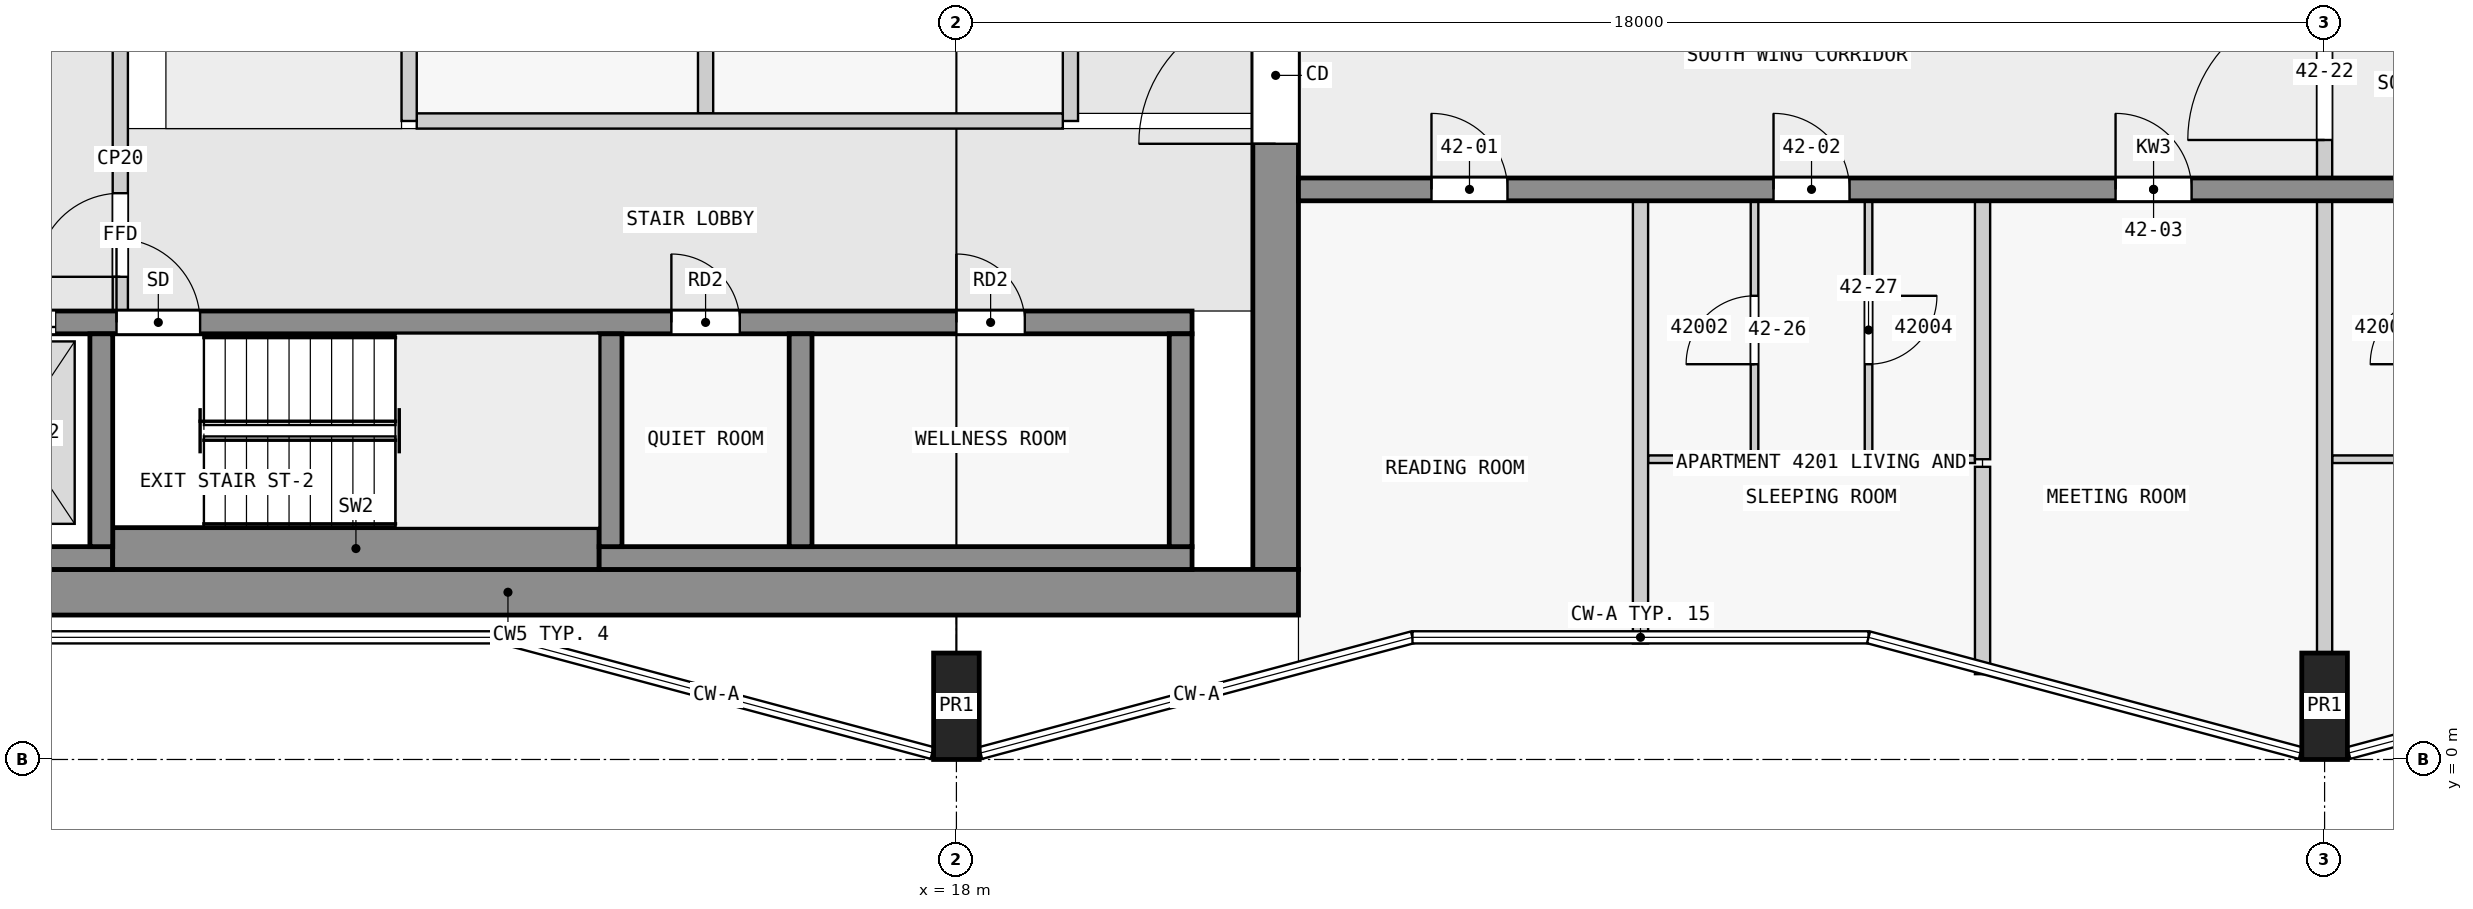
"""IFC4 building model, lengths in metres.
Left out: names, types, materials, properties, quantities, classifications, styles, units other than length and angle.
Written with IfcOpenShell. Run it as: python <this file> out.ifc"""

import sys

from ifc_helpers import new_model, si_unit, direction, frame, frame_2d, origin, origin_2d, place, context, subcontext, project, spatial, rectangle, extrude, element, fill, save


model = new_model("IFC4")
c1 = context("Model", 3, precision=1e-05, world=origin(), true_north=direction((0.0, 1.0)))
c2 = subcontext(c1, "Body", "Model", "MODEL_VIEW")
j1 = project(units=[si_unit("LENGTHUNIT", "METRE"), si_unit("PLANEANGLEUNIT", "RADIAN")], contexts=[c1])
p1 = place(None, origin())
s1 = spatial("IfcSite", under=j1, at=p1, CompositionType="ELEMENT")
p2 = place(p1, origin())
s2 = spatial("IfcBuilding", under=s1, at=p2, CompositionType="ELEMENT")
p3 = place(p2, frame((0.0, 0.0, 163.9)))
s3 = spatial("IfcBuildingStorey", under=s2, at=p3, CompositionType="ELEMENT", Elevation=163.9)
for number, where, z_axis, x_axis in (
    (1, (18.0, 0.7, 0.0), (0.0, 0.0, 1.0), (1.0, 0.0, 0.0)),
    (2, (36.0, 0.7, 0.0), (0.0, 0.0, 1.0), (1.0, 0.0, 0.0)),
):
    element("IfcColumn", number, at=place(p3, frame(where, z_axis=z_axis, x_axis=x_axis)), inside=s3, PredefinedType="COLUMN", context=c2, shape_type="SweptSolid", body=[
        extrude(rectangle(XDim=0.6, YDim=1.4, at=origin_2d()), origin(), (0.0, 0.0, 1.0), 3.5),
    ])
p4 = place(p3, frame((1.7, 2.2, 0.0), z_axis=(0.0, 0.0, 1.0), x_axis=(1.0, 0.0, 0.0)))
e3 = element("IfcWall", 3, at=p4, inside=s3, PredefinedType="SHEAR", context=c2, shape_type="SweptSolid", body=[
    extrude(rectangle(XDim=20.8, YDim=0.6, at=frame_2d((10.4, 0.0))), origin(), (0.0, 0.0, 1.0), 3.25),
])
p5 = place(p3, frame((22.2, 2.5, 0.0), z_axis=(0.0, 0.0, 1.0), x_axis=(0.0, 1.0, 0.0)))
e4 = element("IfcWall", 4, at=p5, inside=s3, PredefinedType="SHEAR", context=c2, shape_type="SweptSolid", body=[
    extrude(rectangle(XDim=14.9, YDim=0.6, at=frame_2d((7.45, 0.0))), origin(), (0.0, 0.0, 1.0), 3.25),
])
p6 = place(p5, frame((5.6, 0.0, 0.0)))
e5 = element("IfcOpeningElement", 5, at=p6, cuts=e4, PredefinedType="OPENING", context=c2, shape_type="SweptSolid", body=[
    extrude(rectangle(XDim=1.8, YDim=2.1, at=frame_2d((0.9, 1.05))), frame((0.0, 0.31, 0.0), z_axis=(0.0, -1.0, 0.0), x_axis=(1.0, 0.0, 0.0)), (0.0, 0.0, 1.0), 0.62),
])
p7 = place(p3, frame((2.3, 2.65, 0.0), z_axis=(0.0, 0.0, 1.0), x_axis=(1.0, 0.0, 0.0)))
e6 = element("IfcWall", 6, at=p7, inside=s3, PredefinedType="SHEAR", context=c2, shape_type="SweptSolid", body=[
    extrude(rectangle(XDim=4.6, YDim=0.3, at=frame_2d((2.3, 0.0))), origin(), (0.0, 0.0, 1.0), 3.25),
])
p8 = place(p3, frame((6.9, 2.775, 0.0), z_axis=(0.0, 0.0, 1.0), x_axis=(1.0, 0.0, 0.0)))
e7 = element("IfcWall", 7, at=p8, inside=s3, PredefinedType="SHEAR", context=c2, shape_type="SweptSolid", body=[
    extrude(rectangle(XDim=6.4, YDim=0.55, at=frame_2d((3.2, 0.0))), origin(), (0.0, 0.0, 1.0), 3.25),
])
p9 = place(p3, frame((13.3, 2.65, 0.0), z_axis=(0.0, 0.0, 1.0), x_axis=(1.0, 0.0, 0.0)))
e8 = element("IfcWall", 8, at=p9, inside=s3, PredefinedType="SHEAR", context=c2, shape_type="SweptSolid", body=[
    extrude(rectangle(XDim=7.8, YDim=0.3, at=frame_2d((3.9, 0.0))), origin(), (0.0, 0.0, 1.0), 3.25),
])
for number, where, z_axis, x_axis in (
    (9, (6.75, 2.8, 0.0), (0.0, 0.0, 1.0), (0.0, 1.0, 0.0)),
    (10, (13.45, 2.8, 0.0), (0.0, 0.0, 1.0), (0.0, 1.0, 0.0)),
    (11, (15.95, 2.8, 0.0), (0.0, 0.0, 1.0), (0.0, 1.0, 0.0)),
    (12, (20.95, 2.8, 0.0), (0.0, 0.0, 1.0), (0.0, 1.0, 0.0)),
):
    element("IfcWall", number, at=place(p3, frame(where, z_axis=z_axis, x_axis=x_axis)), inside=s3, PredefinedType="SHEAR", context=c2, shape_type="SweptSolid", body=[
        extrude(rectangle(XDim=2.8, YDim=0.3, at=frame_2d((1.4, 0.0))), origin(), (0.0, 0.0, 1.0), 3.25),
    ])
p10 = place(p3, frame((2.3, 5.75, 0.0), z_axis=(0.0, 0.0, 1.0), x_axis=(1.0, 0.0, 0.0)))
e13 = element("IfcWall", 13, at=p10, inside=s3, PredefinedType="SHEAR", context=c2, shape_type="SweptSolid", body=[
    extrude(rectangle(XDim=18.8, YDim=0.3, at=frame_2d((9.4, 0.0))), origin(), (0.0, 0.0, 1.0), 3.25),
])
p11 = place(p10, frame((4.65, 0.0, 0.0)))
e14 = element("IfcOpeningElement", 14, at=p11, cuts=e13, PredefinedType="OPENING", context=c2, shape_type="SweptSolid", body=[
    extrude(rectangle(XDim=1.1, YDim=2.1, at=frame_2d((0.55, 1.05))), frame((0.0, 0.16, 0.0), z_axis=(0.0, -1.0, 0.0), x_axis=(1.0, 0.0, 0.0)), (0.0, 0.0, 1.0), 0.32),
])
p12 = place(p10, frame((0.45, 0.0, 0.0)))
e15 = element("IfcOpeningElement", 15, at=p12, cuts=e13, PredefinedType="OPENING", context=c2, shape_type="SweptSolid", body=[
    extrude(rectangle(XDim=1.1, YDim=2.1, at=frame_2d((0.55, 1.05))), frame((0.0, 0.16, 0.0), z_axis=(0.0, -1.0, 0.0), x_axis=(1.0, 0.0, 0.0)), (0.0, 0.0, 1.0), 0.32),
])
p13 = place(p10, frame((2.75, 0.0, 0.0)))
e16 = element("IfcOpeningElement", 16, at=p13, cuts=e13, PredefinedType="OPENING", context=c2, shape_type="SweptSolid", body=[
    extrude(rectangle(XDim=1.1, YDim=2.1, at=frame_2d((0.55, 1.05))), frame((0.0, 0.16, 0.0), z_axis=(0.0, -1.0, 0.0), x_axis=(1.0, 0.0, 0.0)), (0.0, 0.0, 1.0), 0.32),
])
p14 = place(p10, frame((11.95, 0.0, 0.0)))
e17 = element("IfcOpeningElement", 17, at=p14, cuts=e13, PredefinedType="OPENING", context=c2, shape_type="SweptSolid", body=[
    extrude(rectangle(XDim=0.9, YDim=2.1, at=frame_2d((0.45, 1.05))), frame((0.0, 0.16, 0.0), z_axis=(0.0, -1.0, 0.0), x_axis=(1.0, 0.0, 0.0)), (0.0, 0.0, 1.0), 0.32),
])
p15 = place(p10, frame((15.7, 0.0, 0.0)))
e18 = element("IfcOpeningElement", 18, at=p15, cuts=e13, PredefinedType="OPENING", context=c2, shape_type="SweptSolid", body=[
    extrude(rectangle(XDim=0.9, YDim=2.1, at=frame_2d((0.45, 1.05))), frame((0.0, 0.16, 0.0), z_axis=(0.0, -1.0, 0.0), x_axis=(1.0, 0.0, 0.0)), (0.0, 0.0, 1.0), 0.32),
])
p16 = place(p3, frame((22.5, 7.5, 0.0), z_axis=(0.0, 0.0, 1.0), x_axis=(1.0, 0.0, 0.0)))
e19 = element("IfcWall", 19, at=p16, inside=s3, PredefinedType="SHEAR", context=c2, shape_type="SweptSolid", body=[
    extrude(rectangle(XDim=22.5, YDim=0.3, at=frame_2d((11.25, 0.0))), origin(), (0.0, 0.0, 1.0), 3.25),
])
p17 = place(p16, frame((1.75, 0.0, 0.0)))
e20 = element("IfcOpeningElement", 20, at=p17, cuts=e19, PredefinedType="OPENING", context=c2, shape_type="SweptSolid", body=[
    extrude(rectangle(XDim=1.0, YDim=2.1, at=frame_2d((0.5, 1.05))), frame((0.0, 0.16, 0.0), z_axis=(0.0, -1.0, 0.0), x_axis=(1.0, 0.0, 0.0)), (0.0, 0.0, 1.0), 0.32),
])
p18 = place(p16, frame((6.25, 0.0, 0.0)))
e21 = element("IfcOpeningElement", 21, at=p18, cuts=e19, PredefinedType="OPENING", context=c2, shape_type="SweptSolid", body=[
    extrude(rectangle(XDim=1.0, YDim=2.1, at=frame_2d((0.5, 1.05))), frame((0.0, 0.16, 0.0), z_axis=(0.0, -1.0, 0.0), x_axis=(1.0, 0.0, 0.0)), (0.0, 0.0, 1.0), 0.32),
])
p19 = place(p16, frame((10.75, 0.0, 0.0)))
e22 = element("IfcOpeningElement", 22, at=p19, cuts=e19, PredefinedType="OPENING", context=c2, shape_type="SweptSolid", body=[
    extrude(rectangle(XDim=1.0, YDim=2.1, at=frame_2d((0.5, 1.05))), frame((0.0, 0.16, 0.0), z_axis=(0.0, -1.0, 0.0), x_axis=(1.0, 0.0, 0.0)), (0.0, 0.0, 1.0), 0.32),
])
p20 = place(p16, frame((15.25, 0.0, 0.0)))
e23 = element("IfcOpeningElement", 23, at=p20, cuts=e19, PredefinedType="OPENING", context=c2, shape_type="SweptSolid", body=[
    extrude(rectangle(XDim=1.0, YDim=2.1, at=frame_2d((0.5, 1.05))), frame((0.0, 0.16, 0.0), z_axis=(0.0, -1.0, 0.0), x_axis=(1.0, 0.0, 0.0)), (0.0, 0.0, 1.0), 0.32),
])
p21 = place(p16, frame((18.75, 0.0, 0.0)))
e24 = element("IfcOpeningElement", 24, at=p21, cuts=e19, PredefinedType="OPENING", context=c2, shape_type="SweptSolid", body=[
    extrude(rectangle(XDim=0.9, YDim=2.1, at=frame_2d((0.45, 1.05))), frame((0.0, 0.16, 0.0), z_axis=(0.0, -1.0, 0.0), x_axis=(1.0, 0.0, 0.0)), (0.0, 0.0, 1.0), 0.32),
])
p22 = place(p16, frame((20.95, 0.0, 0.0)))
e25 = element("IfcOpeningElement", 25, at=p22, cuts=e19, PredefinedType="OPENING", context=c2, shape_type="SweptSolid", body=[
    extrude(rectangle(XDim=1.0, YDim=2.1, at=frame_2d((0.5, 1.05))), frame((0.0, 0.16, 0.0), z_axis=(0.0, -1.0, 0.0), x_axis=(1.0, 0.0, 0.0)), (0.0, 0.0, 1.0), 0.32),
])
p23 = place(p3, frame((7.0, 5.9, 0.0), z_axis=(0.0, 0.0, 1.0), x_axis=(0.0, 1.0, 0.0)))
e26 = element("IfcWall", 26, at=p23, inside=s3, PredefinedType="PARTITIONING", context=c2, shape_type="SweptSolid", body=[
    extrude(rectangle(XDim=4.0, YDim=0.2, at=frame_2d((2.0, 0.0))), origin(), (0.0, 0.0, 1.0), 3.25),
])
p24 = place(p23, frame((0.45, 0.0, 0.0)))
e27 = element("IfcOpeningElement", 27, at=p24, cuts=e26, PredefinedType="OPENING", context=c2, shape_type="SweptSolid", body=[
    extrude(rectangle(XDim=1.1, YDim=2.1, at=frame_2d((0.55, 1.05))), frame((0.0, 0.11, 0.0), z_axis=(0.0, -1.0, 0.0), x_axis=(1.0, 0.0, 0.0)), (0.0, 0.0, 1.0), 0.22),
])
p25 = place(p3, frame((10.8, 8.4, 0.0), z_axis=(0.0, 0.0, 1.0), x_axis=(0.0, 1.0, 0.0)))
e28 = element("IfcWall", 28, at=p25, inside=s3, PredefinedType="PARTITIONING", context=c2, shape_type="SweptSolid", body=[
    extrude(rectangle(XDim=3.8, YDim=0.2, at=frame_2d((1.9, 0.0))), origin(), (0.0, 0.0, 1.0), 3.25),
])
p26 = place(p3, frame((10.9, 8.4, 0.0), z_axis=(0.0, 0.0, 1.0), x_axis=(1.0, 0.0, 0.0)))
e29 = element("IfcWall", 29, at=p26, inside=s3, PredefinedType="PARTITIONING", context=c2, shape_type="SweptSolid", body=[
    extrude(rectangle(XDim=8.5, YDim=0.2, at=frame_2d((4.25, 0.0))), origin(), (0.0, 0.0, 1.0), 3.25),
])
p27 = place(p3, frame((19.5, 8.4, 0.0), z_axis=(0.0, 0.0, 1.0), x_axis=(0.0, 1.0, 0.0)))
e30 = element("IfcWall", 30, at=p27, inside=s3, PredefinedType="PARTITIONING", context=c2, shape_type="SweptSolid", body=[
    extrude(rectangle(XDim=3.8, YDim=0.2, at=frame_2d((1.9, 0.0))), origin(), (0.0, 0.0, 1.0), 3.25),
])
p28 = place(p3, frame((14.7, 8.5, 0.0), z_axis=(0.0, 0.0, 1.0), x_axis=(0.0, 1.0, 0.0)))
e31 = element("IfcWall", 31, at=p28, inside=s3, PredefinedType="PARTITIONING", context=c2, shape_type="SweptSolid", body=[
    extrude(rectangle(XDim=3.6, YDim=0.2, at=frame_2d((1.8, 0.0))), origin(), (0.0, 0.0, 1.0), 3.25),
])
for number, where, z_axis, x_axis in (
    (32, (27.1, 3.95, 0.0), (0.0, 0.0, 1.0), (1.0, 0.0, 0.0)),
    (33, (30.05, 3.95, 0.0), (0.0, 0.0, 1.0), (1.0, 0.0, 0.0)),
    (34, (36.1, 3.95, 0.0), (0.0, 0.0, 1.0), (1.0, 0.0, 0.0)),
):
    element("IfcWall", number, at=place(p3, frame(where, z_axis=z_axis, x_axis=x_axis)), inside=s3, PredefinedType="PARTITIONING", context=c2, shape_type="SweptSolid", body=[
        extrude(rectangle(XDim=1.35, YDim=0.1, at=frame_2d((0.675, 0.0))), origin(), (0.0, 0.0, 1.0), 3.25),
    ])
p29 = place(p3, frame((27.0, 1.527, 0.0), z_axis=(0.0, 0.0, 1.0), x_axis=(0.0, 1.0, 0.0)))
e35 = element("IfcWall", 35, at=p29, inside=s3, PredefinedType="PARTITIONING", context=c2, shape_type="SweptSolid", body=[
    extrude(rectangle(XDim=5.823, YDim=0.2, at=frame_2d((2.912, 0.0))), origin(), (0.0, 0.0, 1.0), 3.25),
])
p30 = place(p3, frame((28.5, 3.95, 0.0), z_axis=(0.0, 0.0, 1.0), x_axis=(0.0, 1.0, 0.0)))
e36 = element("IfcWall", 36, at=p30, inside=s3, PredefinedType="PARTITIONING", context=c2, shape_type="SweptSolid", body=[
    extrude(rectangle(XDim=3.4, YDim=0.1, at=frame_2d((1.7, 0.0))), origin(), (0.0, 0.0, 1.0), 3.25),
])
p31 = place(p30, frame((1.25, 0.0, 0.0)))
e37 = element("IfcOpeningElement", 37, at=p31, cuts=e36, PredefinedType="OPENING", context=c2, shape_type="SweptSolid", body=[
    extrude(rectangle(XDim=0.9, YDim=2.1, at=frame_2d((0.45, 1.05))), frame((0.0, 0.06, 0.0), z_axis=(0.0, -1.0, 0.0), x_axis=(1.0, 0.0, 0.0)), (0.0, 0.0, 1.0), 0.12),
])
p32 = place(p3, frame((30.0, 7.35, 0.0), z_axis=(0.0, 0.0, 1.0), x_axis=(0.0, -1.0, 0.0)))
e38 = element("IfcWall", 38, at=p32, inside=s3, PredefinedType="PARTITIONING", context=c2, shape_type="SweptSolid", body=[
    extrude(rectangle(XDim=3.4, YDim=0.1, at=frame_2d((1.7, 0.0))), origin(), (0.0, 0.0, 1.0), 3.25),
])
p33 = place(p32, frame((1.25, 0.0, 0.0)))
e39 = element("IfcOpeningElement", 39, at=p33, cuts=e38, PredefinedType="OPENING", context=c2, shape_type="SweptSolid", body=[
    extrude(rectangle(XDim=0.9, YDim=2.1, at=frame_2d((0.45, 1.05))), frame((0.0, 0.06, 0.0), z_axis=(0.0, -1.0, 0.0), x_axis=(1.0, 0.0, 0.0)), (0.0, 0.0, 1.0), 0.12),
])
p34 = place(p3, frame((31.5, 3.85, 0.0), z_axis=(0.0, 0.0, 1.0), x_axis=(0.0, -1.0, 0.0)))
e40 = element("IfcWall", 40, at=p34, inside=s3, PredefinedType="PARTITIONING", context=c2, shape_type="SweptSolid", body=[
    extrude(rectangle(XDim=2.728, YDim=0.2, at=frame_2d((1.364, 0.0))), origin(), (0.0, 0.0, 1.0), 3.25),
])
p35 = place(p3, frame((31.5, 3.95, 0.0), z_axis=(0.0, 0.0, 1.0), x_axis=(0.0, 1.0, 0.0)))
e41 = element("IfcWall", 41, at=p35, inside=s3, PredefinedType="PARTITIONING", context=c2, shape_type="SweptSolid", body=[
    extrude(rectangle(XDim=3.4, YDim=0.2, at=frame_2d((1.7, 0.0))), origin(), (0.0, 0.0, 1.0), 3.25),
])
p36 = place(p3, frame((36.0, 1.4, 0.0), z_axis=(0.0, 0.0, 1.0), x_axis=(0.0, 1.0, 0.0)))
e42 = element("IfcWall", 42, at=p36, inside=s3, PredefinedType="PARTITIONING", context=c2, shape_type="SweptSolid", body=[
    extrude(rectangle(XDim=5.95, YDim=0.2, at=frame_2d((2.975, 0.0))), origin(), (0.0, 0.0, 1.0), 3.25),
])
p37 = place(p3, frame((36.0, 7.45, 0.0), z_axis=(0.0, 0.0, 1.0), x_axis=(0.0, 1.0, 0.0)))
e43 = element("IfcWall", 43, at=p37, inside=s3, PredefinedType="PARTITIONING", context=c2, shape_type="SweptSolid", body=[
    extrude(rectangle(XDim=3.1, YDim=0.2, at=frame_2d((1.55, 0.0))), origin(), (0.0, 0.0, 1.0), 3.25),
])
p38 = place(p37, frame((0.7, 0.0, 0.0)))
e44 = element("IfcOpeningElement", 44, at=p38, cuts=e43, PredefinedType="OPENING", context=c2, shape_type="SweptSolid", body=[
    extrude(rectangle(XDim=1.8, YDim=2.1, at=frame_2d((0.9, 1.05))), frame((0.0, 0.11, 0.0), z_axis=(0.0, -1.0, 0.0), x_axis=(1.0, 0.0, 0.0)), (0.0, 0.0, 1.0), 0.22),
])
p39 = place(p24, origin())
e45 = element("IfcDoor", 45, at=p39, inside=s3, OperationType="SINGLE_SWING_LEFT", PredefinedType="DOOR", context=c2, shape_type="SweptSolid", body=[
    extrude(rectangle(XDim=1.1, YDim=2.1, at=frame_2d((0.55, 1.05))), frame((0.0, 0.025, 0.0), z_axis=(0.0, -1.0, 0.0), x_axis=(1.0, 0.0, 0.0)), (0.0, 0.0, 1.0), 0.05),
])
fill(e27, e45)
p40 = place(p11, origin())
e46 = element("IfcDoor", 46, at=p40, inside=s3, OperationType="SINGLE_SWING_LEFT", PredefinedType="DOOR", context=c2, shape_type="SweptSolid", body=[
    extrude(rectangle(XDim=1.1, YDim=2.1, at=frame_2d((0.55, 1.05))), frame((0.0, 0.025, 0.0), z_axis=(0.0, -1.0, 0.0), x_axis=(1.0, 0.0, 0.0)), (0.0, 0.0, 1.0), 0.05),
])
fill(e14, e46)
p41 = place(p13, origin())
e47 = element("IfcDoor", 47, at=p41, inside=s3, OperationType="DOUBLE_DOOR_SLIDING", PredefinedType="DOOR", context=c2, shape_type="SweptSolid", body=[
    extrude(rectangle(XDim=1.1, YDim=2.1, at=frame_2d((0.55, 1.05))), frame((0.0, 0.025, 0.0), z_axis=(0.0, -1.0, 0.0), x_axis=(1.0, 0.0, 0.0)), (0.0, 0.0, 1.0), 0.05),
])
fill(e16, e47)
p42 = place(p6, origin())
e48 = element("IfcDoor", 48, at=p42, inside=s3, OperationType="DOUBLE_DOOR_SINGLE_SWING", PredefinedType="DOOR", context=c2, shape_type="SweptSolid", body=[
    extrude(rectangle(XDim=1.8, YDim=2.1, at=frame_2d((0.9, 1.05))), frame((0.0, 0.025, 0.0), z_axis=(0.0, -1.0, 0.0), x_axis=(1.0, 0.0, 0.0)), (0.0, 0.0, 1.0), 0.05),
])
fill(e5, e48)
p43 = place(p14, origin())
e49 = element("IfcDoor", 49, at=p43, inside=s3, OperationType="SINGLE_SWING_LEFT", PredefinedType="DOOR", context=c2, shape_type="SweptSolid", body=[
    extrude(rectangle(XDim=0.9, YDim=2.1, at=frame_2d((0.45, 1.05))), frame((0.0, 0.025, 0.0), z_axis=(0.0, -1.0, 0.0), x_axis=(1.0, 0.0, 0.0)), (0.0, 0.0, 1.0), 0.05),
])
fill(e17, e49)
p44 = place(p15, origin())
e50 = element("IfcDoor", 50, at=p44, inside=s3, OperationType="SINGLE_SWING_LEFT", PredefinedType="DOOR", context=c2, shape_type="SweptSolid", body=[
    extrude(rectangle(XDim=0.9, YDim=2.1, at=frame_2d((0.45, 1.05))), frame((0.0, 0.025, 0.0), z_axis=(0.0, -1.0, 0.0), x_axis=(1.0, 0.0, 0.0)), (0.0, 0.0, 1.0), 0.05),
])
fill(e18, e50)
p45 = place(p17, origin())
e51 = element("IfcDoor", 51, at=p45, inside=s3, OperationType="SINGLE_SWING_LEFT", PredefinedType="DOOR", context=c2, shape_type="SweptSolid", body=[
    extrude(rectangle(XDim=1.0, YDim=2.1, at=frame_2d((0.5, 1.05))), frame((0.0, 0.025, 0.0), z_axis=(0.0, -1.0, 0.0), x_axis=(1.0, 0.0, 0.0)), (0.0, 0.0, 1.0), 0.05),
])
fill(e20, e51)
p46 = place(p18, origin())
e52 = element("IfcDoor", 52, at=p46, inside=s3, OperationType="SINGLE_SWING_LEFT", PredefinedType="DOOR", context=c2, shape_type="SweptSolid", body=[
    extrude(rectangle(XDim=1.0, YDim=2.1, at=frame_2d((0.5, 1.05))), frame((0.0, 0.025, 0.0), z_axis=(0.0, -1.0, 0.0), x_axis=(1.0, 0.0, 0.0)), (0.0, 0.0, 1.0), 0.05),
])
fill(e21, e52)
p47 = place(p19, origin())
e53 = element("IfcDoor", 53, at=p47, inside=s3, OperationType="SINGLE_SWING_LEFT", PredefinedType="DOOR", context=c2, shape_type="SweptSolid", body=[
    extrude(rectangle(XDim=1.0, YDim=2.1, at=frame_2d((0.5, 1.05))), frame((0.0, 0.025, 0.0), z_axis=(0.0, -1.0, 0.0), x_axis=(1.0, 0.0, 0.0)), (0.0, 0.0, 1.0), 0.05),
])
fill(e22, e53)
p48 = place(p38, origin())
e54 = element("IfcDoor", 54, at=p48, inside=s3, OperationType="SINGLE_SWING_RIGHT", PredefinedType="DOOR", context=c2, shape_type="SweptSolid", body=[
    extrude(rectangle(XDim=1.8, YDim=2.1, at=frame_2d((0.9, 1.05))), frame((0.0, 0.025, 0.0), z_axis=(0.0, -1.0, 0.0), x_axis=(1.0, 0.0, 0.0)), (0.0, 0.0, 1.0), 0.05),
])
fill(e44, e54)
p49 = place(p31, origin())
e55 = element("IfcDoor", 55, at=p49, inside=s3, OperationType="SINGLE_SWING_RIGHT", PredefinedType="DOOR", context=c2, shape_type="SweptSolid", body=[
    extrude(rectangle(XDim=0.9, YDim=2.1, at=frame_2d((0.45, 1.05))), frame((0.0, 0.025, 0.0), z_axis=(0.0, -1.0, 0.0), x_axis=(1.0, 0.0, 0.0)), (0.0, 0.0, 1.0), 0.05),
])
fill(e37, e55)
p50 = place(p33, origin())
e56 = element("IfcDoor", 56, at=p50, inside=s3, OperationType="SINGLE_SWING_RIGHT", PredefinedType="DOOR", context=c2, shape_type="SweptSolid", body=[
    extrude(rectangle(XDim=0.9, YDim=2.1, at=frame_2d((0.45, 1.05))), frame((0.0, 0.025, 0.0), z_axis=(0.0, -1.0, 0.0), x_axis=(1.0, 0.0, 0.0)), (0.0, 0.0, 1.0), 0.05),
])
fill(e39, e56)
save(model, sys.argv[1])
